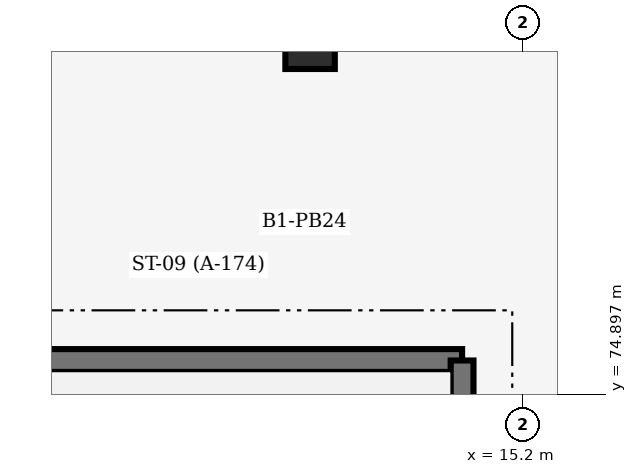
"""IFC4 building model, lengths in metres.
Left out: names, types, materials, properties, quantities, classifications, styles, units other than length and angle.
Written with IfcOpenShell. Run it as: python <this file> out.ifc"""

import sys

from ifc_helpers import new_model, si_unit, direction, frame, frame_2d, origin, origin_2d, place, context, subcontext, project, spatial, rectangle, extrude, element, save


model = new_model("IFC4")
c1 = context("Model", 3, precision=1e-05, world=origin(), true_north=direction((0.0, 1.0)))
c2 = subcontext(c1, "Body", "Model", "MODEL_VIEW")
j1 = project(units=[si_unit("LENGTHUNIT", "METRE"), si_unit("PLANEANGLEUNIT", "RADIAN")], contexts=[c1])
p1 = place(None, origin())
s1 = spatial("IfcSite", under=j1, at=p1, CompositionType="ELEMENT")
p2 = place(p1, origin())
s2 = spatial("IfcBuilding", under=s1, at=p2, CompositionType="ELEMENT")
p3 = place(p2, frame((0.0, 0.0, -4.8)))
s3 = spatial("IfcBuildingStorey", under=s2, at=p3, CompositionType="ELEMENT", Elevation=-4.8)
p4 = place(p3, frame((12.4, 79.5, 0.0), z_axis=(0.0, 0.0, 1.0), x_axis=(1.0, 0.0, 0.0)))
e1 = element("IfcColumn", 1, at=p4, inside=s3, PredefinedType="COLUMN", context=c2, shape_type="SweptSolid", body=[
    extrude(rectangle(XDim=0.65, YDim=0.65, at=origin_2d()), origin(), (0.0, 0.0, 1.0), 4.8),
])
p5 = place(p3, frame((7.46, 75.34, 0.0), z_axis=(0.0, 0.0, 1.0), x_axis=(1.0, 0.0, 0.0)))
e2 = element("IfcWall", 2, at=p5, inside=s3, PredefinedType="SHEAR", context=c2, shape_type="SweptSolid", body=[
    extrude(rectangle(XDim=6.94, YDim=0.3, at=frame_2d((3.47, 0.0))), origin(), (0.0, 0.0, 1.0), 4.5),
])
p6 = place(p3, frame((14.4, 75.34, 0.0), z_axis=(0.0, 0.0, 1.0), x_axis=(0.0, -1.0, 0.0)))
e3 = element("IfcWall", 3, at=p6, inside=s3, PredefinedType="SHEAR", context=c2, shape_type="SweptSolid", body=[
    extrude(rectangle(XDim=11.48, YDim=0.3, at=frame_2d((5.74, 0.0))), origin(), (0.0, 0.0, 1.0), 4.5),
])
save(model, sys.argv[1])
